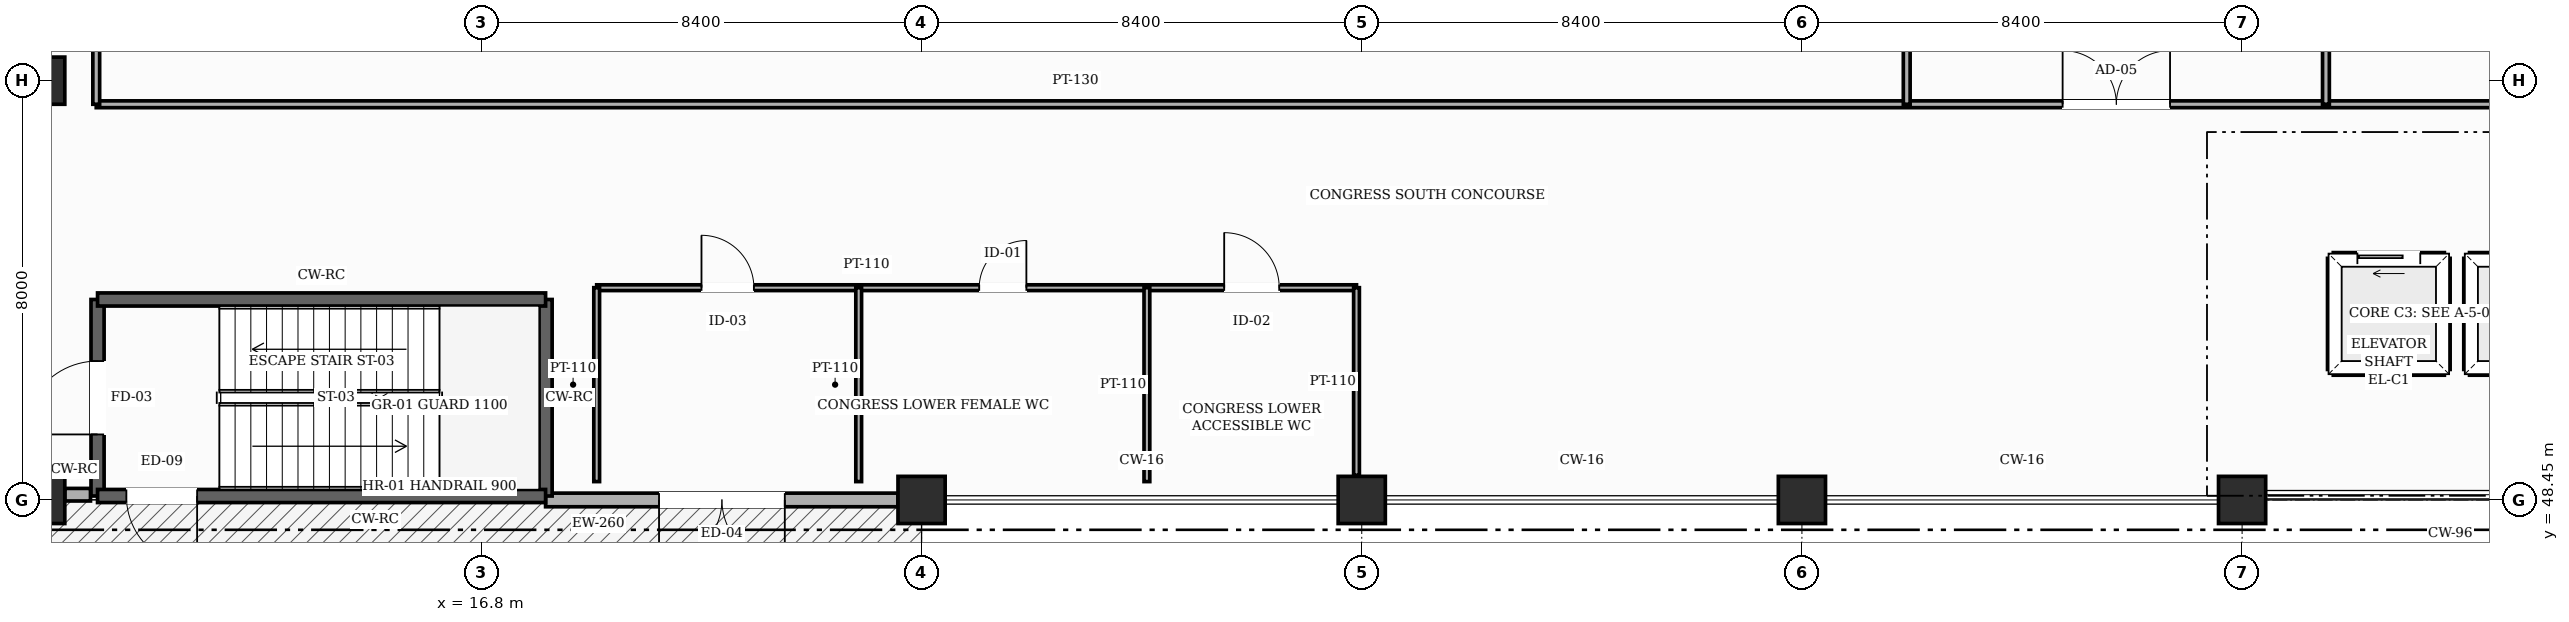
"""IFC4 building model, lengths in metres.
Left out: names, types, materials, properties, quantities, classifications, styles, units other than length and angle.
Written with IfcOpenShell. Run it as: python <this file> out.ifc"""

import sys

from ifc_helpers import new_model, si_unit, direction, frame, frame_2d, origin, origin_2d, place, context, subcontext, project, spatial, rectangle, hollow_rectangle, extrude, element, fill, save


model = new_model("IFC4")
c1 = context("Model", 3, precision=1e-05, world=origin(), true_north=direction((0.0, 1.0)))
c2 = subcontext(c1, "Body", "Model", "MODEL_VIEW")
j1 = project(units=[si_unit("LENGTHUNIT", "METRE"), si_unit("PLANEANGLEUNIT", "RADIAN")], contexts=[c1])
p1 = place(None, origin())
s1 = spatial("IfcSite", under=j1, at=p1, CompositionType="ELEMENT")
p2 = place(p1, origin())
s2 = spatial("IfcBuilding", under=s1, at=p2, CompositionType="ELEMENT")
p3 = place(p2, origin())
s3 = spatial("IfcBuildingStorey", under=s2, at=p3, CompositionType="ELEMENT", Elevation=0.0)
for number, where, z_axis, x_axis in (
    (1, (8.4, 48.45, 0.0), (0.0, 0.0, 1.0), (1.0, 0.0, 0.0)),
    (2, (8.4, 56.45, 0.0), (0.0, 0.0, 1.0), (1.0, 0.0, 0.0)),
    (3, (25.2, 48.45, 0.0), (0.0, 0.0, 1.0), (1.0, 0.0, 0.0)),
    (4, (33.6, 48.45, 0.0), (0.0, 0.0, 1.0), (1.0, 0.0, 0.0)),
    (5, (42.0, 48.45, 0.0), (0.0, 0.0, 1.0), (1.0, 0.0, 0.0)),
    (6, (50.4, 48.45, 0.0), (0.0, 0.0, 1.0), (1.0, 0.0, 0.0)),
):
    element("IfcColumn", number, at=place(p3, frame(where, z_axis=z_axis, x_axis=x_axis)), inside=s3, PredefinedType="COLUMN", context=c2, shape_type="SweptSolid", body=[
        extrude(hollow_rectangle(XDim=0.9, YDim=0.9, WallThickness=0.032, InnerFilletRadius=0.032, OuterFilletRadius=0.064, at=origin_2d()), origin(), (0.0, 0.0, 1.0), 5.4),
    ])
p4 = place(p3, frame((24.75, 48.45, 0.0), z_axis=(0.0, 0.0, 1.0), x_axis=(-1.0, 0.0, 0.0)))
e7 = element("IfcWall", 7, at=p4, inside=s3, PredefinedType="SOLIDWALL", context=c2, shape_type="SweptSolid", body=[
    extrude(rectangle(XDim=6.725, YDim=0.26, at=frame_2d((3.363, 0.0))), origin(), (0.0, 0.0, 1.0), 4.125),
])
p5 = place(p4, frame((2.16, 0.0, 0.0)))
e8 = element("IfcOpeningElement", 8, at=p5, cuts=e7, PredefinedType="OPENING", context=c2, shape_type="SweptSolid", body=[
    extrude(rectangle(XDim=2.4, YDim=2.6, at=frame_2d((1.2, 1.3))), frame((0.0, 0.14, 0.0), z_axis=(0.0, -1.0, 0.0), x_axis=(1.0, 0.0, 0.0)), (0.0, 0.0, 1.0), 0.28),
])
p6 = place(p3, frame((9.34, 48.55, 0.0), z_axis=(0.0, 0.0, 1.0), x_axis=(-1.0, 0.0, 0.0)))
e9 = element("IfcWall", 9, at=p6, inside=s3, PredefinedType="SOLIDWALL", context=c2, shape_type="SweptSolid", body=[
    extrude(rectangle(XDim=0.49, YDim=0.24, at=frame_2d((0.245, 0.0))), origin(), (0.0, 0.0, 1.0), 4.125),
])
p7 = place(p3, frame((9.475, 48.525, 0.0), z_axis=(0.0, 0.0, 1.0), x_axis=(0.0, 1.0, 0.0)))
e10 = element("IfcWall", 10, at=p7, inside=s3, PredefinedType="SHEAR", context=c2, shape_type="SweptSolid", body=[
    extrude(rectangle(XDim=3.75, YDim=0.25, at=frame_2d((1.875, 0.0))), origin(), (0.0, 0.0, 1.0), 5.15),
])
p8 = place(p7, frame((1.175, 0.0, 0.0)))
e11 = element("IfcOpeningElement", 11, at=p8, cuts=e10, PredefinedType="OPENING", context=c2, shape_type="SweptSolid", body=[
    extrude(rectangle(XDim=1.4, YDim=2.25, at=frame_2d((0.7, 1.125))), frame((0.0, 0.135, 0.0), z_axis=(0.0, -1.0, 0.0), x_axis=(1.0, 0.0, 0.0)), (0.0, 0.0, 1.0), 0.27),
])
p9 = place(p3, frame((18.025, 52.275, 0.0), z_axis=(0.0, 0.0, 1.0), x_axis=(0.0, -1.0, 0.0)))
e12 = element("IfcWall", 12, at=p9, inside=s3, PredefinedType="SHEAR", context=c2, shape_type="SweptSolid", body=[
    extrude(rectangle(XDim=3.75, YDim=0.25, at=frame_2d((1.875, 0.0))), origin(), (0.0, 0.0, 1.0), 5.15),
])
p10 = place(p3, frame((18.025, 48.525, 0.0), z_axis=(0.0, 0.0, 1.0), x_axis=(-1.0, 0.0, 0.0)))
e13 = element("IfcWall", 13, at=p10, inside=s3, PredefinedType="SHEAR", context=c2, shape_type="SweptSolid", body=[
    extrude(rectangle(XDim=8.55, YDim=0.25, at=frame_2d((4.275, 0.0))), origin(), (0.0, 0.0, 1.0), 5.15),
])
p11 = place(p10, frame((6.65, 0.0, 0.0)))
e14 = element("IfcOpeningElement", 14, at=p11, cuts=e13, PredefinedType="OPENING", context=c2, shape_type="SweptSolid", body=[
    extrude(rectangle(XDim=1.35, YDim=2.3, at=frame_2d((0.675, 1.15))), frame((0.0, 0.135, 0.0), z_axis=(0.0, -1.0, 0.0), x_axis=(1.0, 0.0, 0.0)), (0.0, 0.0, 1.0), 0.27),
])
p12 = place(p3, frame((9.475, 52.275, 0.0), z_axis=(0.0, 0.0, 1.0), x_axis=(1.0, 0.0, 0.0)))
e15 = element("IfcWall", 15, at=p12, inside=s3, PredefinedType="SHEAR", context=c2, shape_type="SweptSolid", body=[
    extrude(rectangle(XDim=8.55, YDim=0.25, at=frame_2d((4.275, 0.0))), origin(), (0.0, 0.0, 1.0), 5.15),
])
p13 = place(p3, frame((52.14, 53.06, 0.0), z_axis=(0.0, 0.0, 1.0), x_axis=(1.0, 0.0, 0.0)))
e16 = element("IfcWall", 16, at=p13, inside=s3, PredefinedType="SHEAR", context=c2, shape_type="SweptSolid", body=[
    extrude(rectangle(XDim=2.12, YDim=0.22, at=frame_2d((1.06, 0.0))), origin(), (0.0, 0.0, 1.0), 5.15),
])
p14 = place(p13, frame((0.46, 0.0, 0.0)))
e17 = element("IfcOpeningElement", 17, at=p14, cuts=e16, PredefinedType="OPENING", context=c2, shape_type="SweptSolid", body=[
    extrude(rectangle(XDim=1.2, YDim=2.25, at=frame_2d((0.6, 1.125))), frame((0.0, 0.12, 0.0), z_axis=(0.0, -1.0, 0.0), x_axis=(1.0, 0.0, 0.0)), (0.0, 0.0, 1.0), 0.24),
])
for number, where, z_axis, x_axis in (
    (18, (52.14, 50.94, 0.0), (0.0, 0.0, 1.0), (1.0, 0.0, 0.0)),
    (19, (54.26, 50.94, 0.0), (0.0, 0.0, 1.0), (0.0, 1.0, 0.0)),
    (20, (52.14, 50.94, 0.0), (0.0, 0.0, 1.0), (0.0, 1.0, 0.0)),
):
    element("IfcWall", number, at=place(p3, frame(where, z_axis=z_axis, x_axis=x_axis)), inside=s3, PredefinedType="SHEAR", context=c2, shape_type="SweptSolid", body=[
        extrude(rectangle(XDim=2.12, YDim=0.22, at=frame_2d((1.06, 0.0))), origin(), (0.0, 0.0, 1.0), 5.15),
    ])
p15 = place(p3, frame((54.74, 53.06, 0.0), z_axis=(0.0, 0.0, 1.0), x_axis=(1.0, 0.0, 0.0)))
e21 = element("IfcWall", 21, at=p15, inside=s3, PredefinedType="SHEAR", context=c2, shape_type="SweptSolid", body=[
    extrude(rectangle(XDim=2.12, YDim=0.22, at=frame_2d((1.06, 0.0))), origin(), (0.0, 0.0, 1.0), 5.15),
])
p16 = place(p15, frame((0.46, 0.0, 0.0)))
e22 = element("IfcOpeningElement", 22, at=p16, cuts=e21, PredefinedType="OPENING", context=c2, shape_type="SweptSolid", body=[
    extrude(rectangle(XDim=1.2, YDim=2.25, at=frame_2d((0.6, 1.125))), frame((0.0, 0.12, 0.0), z_axis=(0.0, -1.0, 0.0), x_axis=(1.0, 0.0, 0.0)), (0.0, 0.0, 1.0), 0.24),
])
for number, where, z_axis, x_axis in (
    (23, (54.74, 50.94, 0.0), (0.0, 0.0, 1.0), (1.0, 0.0, 0.0)),
    (24, (54.74, 50.94, 0.0), (0.0, 0.0, 1.0), (0.0, 1.0, 0.0)),
):
    element("IfcWall", number, at=place(p3, frame(where, z_axis=z_axis, x_axis=x_axis)), inside=s3, PredefinedType="SHEAR", context=c2, shape_type="SweptSolid", body=[
        extrude(rectangle(XDim=2.12, YDim=0.22, at=frame_2d((1.06, 0.0))), origin(), (0.0, 0.0, 1.0), 5.15),
    ])
p17 = place(p3, frame((19.0, 52.5, 0.0), z_axis=(0.0, 0.0, 1.0), x_axis=(1.0, 0.0, 0.0)))
e25 = element("IfcWall", 25, at=p17, inside=s3, PredefinedType="PARTITIONING", context=c2, shape_type="SweptSolid", body=[
    extrude(rectangle(XDim=14.5, YDim=0.11, at=frame_2d((7.25, 0.0))), origin(), (0.0, 0.0, 1.0), 5.135),
])
p18 = place(p17, frame((2.0, 0.0, 0.0)))
e26 = element("IfcOpeningElement", 26, at=p18, cuts=e25, PredefinedType="OPENING", context=c2, shape_type="SweptSolid", body=[
    extrude(rectangle(XDim=1.0, YDim=2.18, at=frame_2d((0.5, 1.09))), frame((0.0, 0.065, 0.0), z_axis=(0.0, -1.0, 0.0), x_axis=(1.0, 0.0, 0.0)), (0.0, 0.0, 1.0), 0.13),
])
p19 = place(p17, frame((7.3, 0.0, 0.0)))
e27 = element("IfcOpeningElement", 27, at=p19, cuts=e25, PredefinedType="OPENING", context=c2, shape_type="SweptSolid", body=[
    extrude(rectangle(XDim=0.9, YDim=2.15, at=frame_2d((0.45, 1.075))), frame((0.0, 0.065, 0.0), z_axis=(0.0, -1.0, 0.0), x_axis=(1.0, 0.0, 0.0)), (0.0, 0.0, 1.0), 0.13),
])
p20 = place(p17, frame((11.975, 0.0, 0.0)))
e28 = element("IfcOpeningElement", 28, at=p20, cuts=e25, PredefinedType="OPENING", context=c2, shape_type="SweptSolid", body=[
    extrude(rectangle(XDim=1.05, YDim=2.2, at=frame_2d((0.525, 1.1))), frame((0.0, 0.065, 0.0), z_axis=(0.0, -1.0, 0.0), x_axis=(1.0, 0.0, 0.0)), (0.0, 0.0, 1.0), 0.13),
])
p21 = place(p3, frame((9.45, 56.0, 0.0), z_axis=(0.0, 0.0, 1.0), x_axis=(1.0, 0.0, 0.0)))
e29 = element("IfcWall", 29, at=p21, inside=s3, PredefinedType="PARTITIONING", context=c2, shape_type="SweptSolid", body=[
    extrude(rectangle(XDim=48.43, YDim=0.13, at=frame_2d((24.215, 0.0))), origin(), (0.0, 0.0, 1.0), 5.135),
])
p22 = place(p21, frame((37.525, 0.0, 0.0)))
e30 = element("IfcOpeningElement", 30, at=p22, cuts=e29, PredefinedType="OPENING", context=c2, shape_type="SweptSolid", body=[
    extrude(rectangle(XDim=2.05, YDim=2.45, at=frame_2d((1.025, 1.225))), frame((0.0, 0.075, 0.0), z_axis=(0.0, -1.0, 0.0), x_axis=(1.0, 0.0, 0.0)), (0.0, 0.0, 1.0), 0.15),
])
p23 = place(p3, frame((9.45, 56.0, 0.0), z_axis=(0.0, 0.0, 1.0), x_axis=(0.0, 1.0, 0.0)))
e31 = element("IfcWall", 31, at=p23, inside=s3, PredefinedType="PARTITIONING", context=c2, shape_type="SweptSolid", body=[
    extrude(rectangle(XDim=49.0, YDim=0.13, at=frame_2d((24.5, 0.0))), origin(), (0.0, 0.0, 1.0), 5.135),
])
p24 = place(p23, frame((46.58, 0.0, 0.0)))
e32 = element("IfcOpeningElement", 32, at=p24, cuts=e31, PredefinedType="OPENING", context=c2, shape_type="SweptSolid", body=[
    extrude(rectangle(XDim=2.3, YDim=2.55, at=frame_2d((1.15, 1.275))), frame((0.0, 0.075, 0.0), z_axis=(0.0, -1.0, 0.0), x_axis=(1.0, 0.0, 0.0)), (0.0, 0.0, 1.0), 0.15),
])
for number, where, z_axis, x_axis in (
    (33, (19.0, 48.8, 0.0), (0.0, 0.0, 1.0), (0.0, 1.0, 0.0)),
    (34, (24.0, 48.8, 0.0), (0.0, 0.0, 1.0), (0.0, 1.0, 0.0)),
    (35, (29.5, 48.8, 0.0), (0.0, 0.0, 1.0), (0.0, 1.0, 0.0)),
):
    element("IfcWall", number, at=place(p3, frame(where, z_axis=z_axis, x_axis=x_axis)), inside=s3, PredefinedType="PARTITIONING", context=c2, shape_type="SweptSolid", body=[
        extrude(rectangle(XDim=3.7, YDim=0.11, at=frame_2d((1.85, 0.0))), origin(), (0.0, 0.0, 1.0), 5.135),
    ])
p25 = place(p3, frame((33.5, 48.92, 0.0), z_axis=(0.0, 0.0, 1.0), x_axis=(0.0, 1.0, 0.0)))
e36 = element("IfcWall", 36, at=p25, inside=s3, PredefinedType="PARTITIONING", context=c2, shape_type="SweptSolid", body=[
    extrude(rectangle(XDim=3.58, YDim=0.11, at=frame_2d((1.79, 0.0))), origin(), (0.0, 0.0, 1.0), 5.135),
])
p26 = place(p3, frame((44.0, 56.0, 0.0), z_axis=(0.0, 0.0, 1.0), x_axis=(0.0, 1.0, 0.0)))
e37 = element("IfcWall", 37, at=p26, inside=s3, PredefinedType="PARTITIONING", context=c2, shape_type="SweptSolid", body=[
    extrude(rectangle(XDim=49.0, YDim=0.13, at=frame_2d((24.5, 0.0))), origin(), (0.0, 0.0, 1.0), 5.135),
])
p27 = place(p3, frame((52.0, 56.0, 0.0), z_axis=(0.0, 0.0, 1.0), x_axis=(0.0, 1.0, 0.0)))
e38 = element("IfcWall", 38, at=p27, inside=s3, PredefinedType="PARTITIONING", context=c2, shape_type="SweptSolid", body=[
    extrude(rectangle(XDim=49.0, YDim=0.13, at=frame_2d((24.5, 0.0))), origin(), (0.0, 0.0, 1.0), 5.135),
])
p28 = place(p27, frame((23.8, 0.0, 0.0)))
e39 = element("IfcOpeningElement", 39, at=p28, cuts=e38, PredefinedType="OPENING", context=c2, shape_type="SweptSolid", body=[
    extrude(rectangle(XDim=1.4, YDim=2.25, at=frame_2d((0.7, 1.125))), frame((0.0, 0.075, 0.0), z_axis=(0.0, -1.0, 0.0), x_axis=(1.0, 0.0, 0.0)), (0.0, 0.0, 1.0), 0.15),
])
p29 = place(p5, origin())
e40 = element("IfcDoor", 40, at=p29, inside=s3, OperationType="DOUBLE_DOOR_SINGLE_SWING", PredefinedType="DOOR", context=c2, shape_type="SweptSolid", body=[
    extrude(rectangle(XDim=2.4, YDim=2.6, at=frame_2d((1.2, 1.3))), frame((0.0, 0.025, 0.0), z_axis=(0.0, -1.0, 0.0), x_axis=(1.0, 0.0, 0.0)), (0.0, 0.0, 1.0), 0.05),
])
fill(e8, e40)
p30 = place(p8, origin())
e41 = element("IfcDoor", 41, at=p30, inside=s3, OperationType="SINGLE_SWING_LEFT", PredefinedType="DOOR", context=c2, shape_type="SweptSolid", body=[
    extrude(rectangle(XDim=1.4, YDim=2.25, at=frame_2d((0.7, 1.125))), frame((0.0, 0.025, 0.0), z_axis=(0.0, -1.0, 0.0), x_axis=(1.0, 0.0, 0.0)), (0.0, 0.0, 1.0), 0.05),
])
fill(e11, e41)
p31 = place(p11, origin())
e42 = element("IfcDoor", 42, at=p31, inside=s3, OperationType="SINGLE_SWING_LEFT", PredefinedType="DOOR", context=c2, shape_type="SweptSolid", body=[
    extrude(rectangle(XDim=1.35, YDim=2.3, at=frame_2d((0.675, 1.15))), frame((0.0, 0.025, 0.0), z_axis=(0.0, -1.0, 0.0), x_axis=(1.0, 0.0, 0.0)), (0.0, 0.0, 1.0), 0.05),
])
fill(e14, e42)
p32 = place(p14, origin())
e43 = element("IfcDoor", 43, at=p32, inside=s3, OperationType="SLIDING_TO_LEFT", PredefinedType="DOOR", context=c2, shape_type="SweptSolid", body=[
    extrude(rectangle(XDim=1.2, YDim=2.25, at=frame_2d((0.6, 1.125))), frame((0.0, 0.025, 0.0), z_axis=(0.0, -1.0, 0.0), x_axis=(1.0, 0.0, 0.0)), (0.0, 0.0, 1.0), 0.05),
])
fill(e17, e43)
p33 = place(p22, origin())
e44 = element("IfcDoor", 44, at=p33, inside=s3, OperationType="DOUBLE_DOOR_SINGLE_SWING", PredefinedType="DOOR", context=c2, shape_type="SweptSolid", body=[
    extrude(rectangle(XDim=2.05, YDim=2.45, at=frame_2d((1.025, 1.225))), frame((0.0, 0.025, 0.0), z_axis=(0.0, -1.0, 0.0), x_axis=(1.0, 0.0, 0.0)), (0.0, 0.0, 1.0), 0.05),
])
fill(e30, e44)
p34 = place(p18, origin())
e45 = element("IfcDoor", 45, at=p34, inside=s3, OperationType="SINGLE_SWING_LEFT", PredefinedType="DOOR", context=c2, shape_type="SweptSolid", body=[
    extrude(rectangle(XDim=1.0, YDim=2.18, at=frame_2d((0.5, 1.09))), frame((0.0, 0.025, 0.0), z_axis=(0.0, -1.0, 0.0), x_axis=(1.0, 0.0, 0.0)), (0.0, 0.0, 1.0), 0.05),
])
fill(e26, e45)
p35 = place(p19, origin())
e46 = element("IfcDoor", 46, at=p35, inside=s3, OperationType="SINGLE_SWING_RIGHT", PredefinedType="DOOR", context=c2, shape_type="SweptSolid", body=[
    extrude(rectangle(XDim=0.9, YDim=2.15, at=frame_2d((0.45, 1.075))), frame((0.0, 0.025, 0.0), z_axis=(0.0, -1.0, 0.0), x_axis=(1.0, 0.0, 0.0)), (0.0, 0.0, 1.0), 0.05),
])
fill(e27, e46)
p36 = place(p20, origin())
e47 = element("IfcDoor", 47, at=p36, inside=s3, OperationType="SINGLE_SWING_LEFT", PredefinedType="DOOR", context=c2, shape_type="SweptSolid", body=[
    extrude(rectangle(XDim=1.05, YDim=2.2, at=frame_2d((0.525, 1.1))), frame((0.0, 0.025, 0.0), z_axis=(0.0, -1.0, 0.0), x_axis=(1.0, 0.0, 0.0)), (0.0, 0.0, 1.0), 0.05),
])
fill(e28, e47)
save(model, sys.argv[1])
